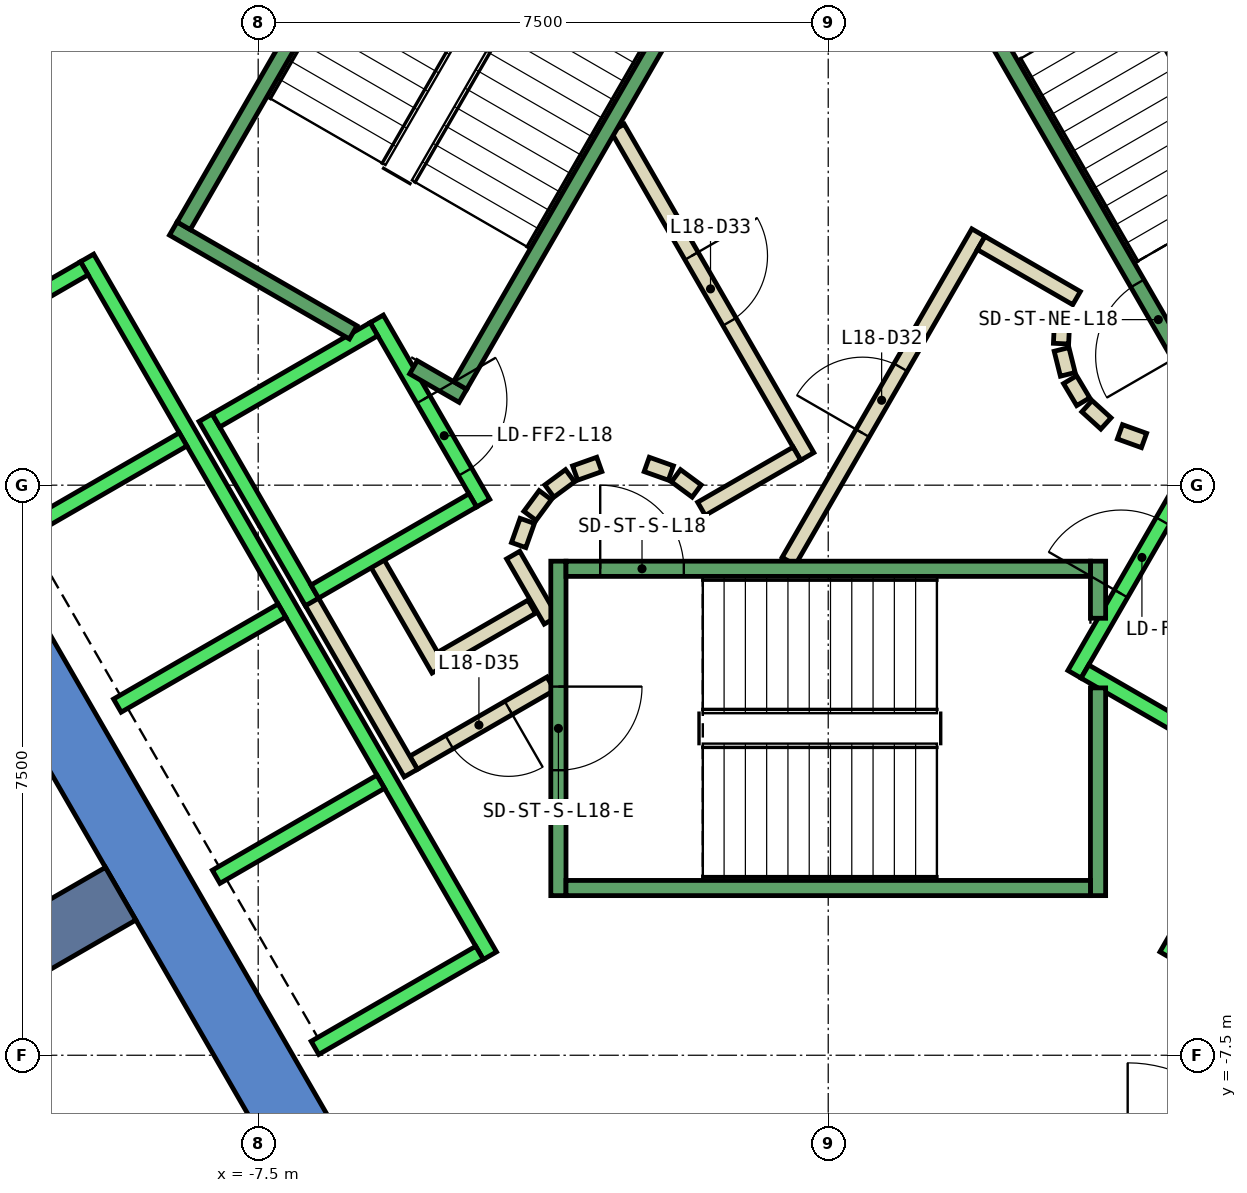
"""IFC4 building model, lengths in metres.
Left out: names, types, materials, properties, quantities, classifications, styles, units other than length and angle.
Written with IfcOpenShell. Run it as: python <this file> out.ifc"""

import sys

from ifc_helpers import new_model, si_unit, direction, frame, frame_2d, origin, place, context, subcontext, project, spatial, polyline, rectangle, outline, extrude, element, fill, save


model = new_model("IFC4")
c1 = context("Model", 3, precision=1e-05, world=origin(), true_north=direction((0.0, 1.0)))
c2 = subcontext(c1, "Body", "Model", "MODEL_VIEW")
j1 = project(units=[si_unit("LENGTHUNIT", "METRE"), si_unit("PLANEANGLEUNIT", "RADIAN")], contexts=[c1])
p1 = place(None, origin())
s1 = spatial("IfcSite", under=j1, at=p1, CompositionType="ELEMENT")
p2 = place(p1, origin())
s2 = spatial("IfcBuilding", under=s1, at=p2, CompositionType="ELEMENT")
p3 = place(p2, frame((0.0, 0.0, 86.6)))
s3 = spatial("IfcBuildingStorey", under=s2, at=p3, CompositionType="ELEMENT", Elevation=86.6)
p4 = place(p3, frame((0.0, 0.0, -0.6)))
e1 = element("IfcWall", 1, at=p4, inside=s3, PredefinedType="SHEAR", context=c2, shape_type="SweptSolid", body=[
    extrude(outline(polyline([(-12.267, 5.252), (-11.488, 4.802), (-6.409, 13.6), (-6.928, 14.5), (-12.267, 5.252)])), origin(), (0.0, 0.0, 1.0), 4.4),
])
p5 = place(p3, frame((0.0, 0.0, -0.6)))
e2 = element("IfcWall", 2, at=p5, inside=s3, PredefinedType="SHEAR", context=c2, shape_type="SweptSolid", body=[
    extrude(outline(polyline([(-13.856, 2.5), (-6.928, -9.5), (-6.409, -8.6), (-12.817, 2.5), (-13.856, 2.5)])), origin(), (0.0, 0.0, 1.0), 4.4),
])
p6 = place(p3, frame((-9.31, -5.375, -0.6), z_axis=(0.0, 0.0, 1.0), x_axis=(-0.866017533419, -0.500013631625, 0.0)))
e3 = element("IfcWall", 3, at=p6, inside=s3, PredefinedType="SHEAR", context=c2, shape_type="SweptSolid", body=[
    extrude(rectangle(XDim=9.0, YDim=0.8, at=frame_2d((4.5, 0.0))), origin(), (0.0, 0.0, 1.0), 4.4),
])
p7 = place(p3, frame((-3.9, -1.599, 0.0), z_axis=(0.0, 0.0, 1.0), x_axis=(-0.865969445389, -0.500096910261, 0.0)))
e4 = element("IfcWall", 4, at=p7, inside=s3, PredefinedType="PARTITIONING", context=c2, shape_type="SweptSolid", body=[
    extrude(rectangle(XDim=1.373, YDim=0.2, at=frame_2d((0.687, 0.0))), origin(), (0.0, 0.0, 1.0), 3.8),
])
p8 = place(p3, frame((-5.126, -2.422, 0.0), z_axis=(0.0, 0.0, 1.0), x_axis=(-0.500062241894, 0.865989465428, 0.0)))
e5 = element("IfcWall", 5, at=p8, inside=s3, PredefinedType="PARTITIONING", context=c2, shape_type="SweptSolid", body=[
    extrude(rectangle(XDim=1.7, YDim=0.2, at=frame_2d((0.85, 0.0))), origin(), (0.0, 0.0, 1.0), 3.8),
])
p9 = place(p3, frame((-3.65, -2.61, 0.0), z_axis=(0.0, 0.0, 1.0), x_axis=(-0.866072462134, -0.499918483688, 0.0)))
e6 = element("IfcWall", 6, at=p9, inside=s3, PredefinedType="PARTITIONING", context=c2, shape_type="SweptSolid", body=[
    extrude(rectangle(XDim=2.084, YDim=0.2, at=frame_2d((1.042, 0.0))), origin(), (0.0, 0.0, 1.0), 3.8),
])
p10 = place(p9, frame((0.642, 0.0, 0.0)))
e7 = element("IfcOpeningElement", 7, at=p10, cuts=e6, PredefinedType="OPENING", context=c2, shape_type="SweptSolid", body=[
    extrude(rectangle(XDim=0.9, YDim=2.1, at=frame_2d((0.45, 1.05))), frame((0.0, 0.11, 0.0), z_axis=(0.0, -1.0, 0.0), x_axis=(1.0, 0.0, 0.0)), (0.0, 0.0, 1.0), 0.22),
])
p11 = place(p3, frame((-5.492, -3.788, 0.0), z_axis=(0.0, 0.0, 1.0), x_axis=(-0.500008949224, 0.866020236886, 0.0)))
e8 = element("IfcWall", 8, at=p11, inside=s3, PredefinedType="PARTITIONING", context=c2, shape_type="SweptSolid", body=[
    extrude(rectangle(XDim=2.68, YDim=0.2, at=frame_2d((1.34, 0.0))), origin(), (0.0, 0.0, 1.0), 3.8),
])
p12 = place(p3, frame((-4.145, -0.92, 0.0), z_axis=(0.0, 0.0, 1.0), x_axis=(0.499743786207, -0.866173278362, 0.0)))
e9 = element("IfcWall", 9, at=p12, inside=s3, PredefinedType="PARTITIONING", context=c2, shape_type="SweptSolid", body=[
    extrude(rectangle(XDim=0.991, YDim=0.2, at=frame_2d((0.495, 0.0))), origin(), (0.0, 0.0, 1.0), 3.8),
])
p13 = place(p3, frame((-0.52, -1.0, 0.0), z_axis=(0.0, 0.0, 1.0), x_axis=(0.50011622646, 0.865958290007, 0.0)))
e10 = element("IfcWall", 10, at=p13, inside=s3, PredefinedType="PARTITIONING", context=c2, shape_type="SweptSolid", body=[
    extrude(rectangle(XDim=4.991, YDim=0.2, at=frame_2d((2.496, 0.0))), origin(), (0.0, 0.0, 1.0), 3.8),
])
p14 = place(p13, frame((1.945, 0.0, 0.0)))
e11 = element("IfcOpeningElement", 11, at=p14, cuts=e10, PredefinedType="OPENING", context=c2, shape_type="SweptSolid", body=[
    extrude(rectangle(XDim=1.0, YDim=2.1, at=frame_2d((0.5, 1.05))), frame((0.0, 0.11, 0.0), z_axis=(0.0, -1.0, 0.0), x_axis=(1.0, 0.0, 0.0)), (0.0, 0.0, 1.0), 0.22),
])
p15 = place(p3, frame((2.012, 3.186, 0.0), z_axis=(0.0, 0.0, 1.0), x_axis=(0.865891012941, -0.500232699559, 0.0)))
e12 = element("IfcWall", 12, at=p15, inside=s3, PredefinedType="PARTITIONING", context=c2, shape_type="SweptSolid", body=[
    extrude(rectangle(XDim=1.449, YDim=0.2, at=frame_2d((0.725, 0.0))), origin(), (0.0, 0.0, 1.0), 3.8),
])
p16 = place(p3, frame((3.079, 2.199, 0.0), z_axis=(0.0, 0.0, 1.0), x_axis=(-0.047771483479, -0.998858290933, 0.0)))
e13 = element("IfcWall", 13, at=p16, inside=s3, PredefinedType="PARTITIONING", context=c2, shape_type="SweptSolid", body=[
    extrude(rectangle(XDim=0.337, YDim=0.2, at=frame_2d((0.169, 0.0))), origin(), (0.0, 0.0, 1.0), 3.8),
])
p17 = place(p3, frame((3.07, 1.786, 0.0), z_axis=(0.0, 0.0, 1.0), x_axis=(0.242705583207, -0.970099994784, 0.0)))
e14 = element("IfcWall", 14, at=p17, inside=s3, PredefinedType="PARTITIONING", context=c2, shape_type="SweptSolid", body=[
    extrude(rectangle(XDim=0.338, YDim=0.2, at=frame_2d((0.169, 0.0))), origin(), (0.0, 0.0, 1.0), 3.8),
])
for number, where, z_axis, x_axis in (
    (15, (3.182, 1.388, 0.0), (0.0, 0.0, 1.0), (0.512, -0.859, 0.0)),
    (16, (3.404, 1.039, 0.0), (0.0, 0.0, 1.0), (0.74, -0.672, 0.0)),
):
    element("IfcWall", number, at=place(p3, frame(where, z_axis=z_axis, x_axis=x_axis)), inside=s3, PredefinedType="PARTITIONING", context=c2, shape_type="SweptSolid", body=[
        extrude(rectangle(XDim=0.338, YDim=0.2, at=frame_2d((0.169, 0.0))), origin(), (0.0, 0.0, 1.0), 3.8),
    ])
p18 = place(p3, frame((3.838, 0.702, 0.0), z_axis=(0.0, 0.0, 1.0), x_axis=(0.941035081519, -0.338308993895, 0.0)))
e17 = element("IfcWall", 17, at=p18, inside=s3, PredefinedType="PARTITIONING", context=c2, shape_type="SweptSolid", body=[
    extrude(rectangle(XDim=0.337, YDim=0.2, at=frame_2d((0.168, 0.0))), origin(), (0.0, 0.0, 1.0), 3.8),
])
p19 = place(p3, frame((-2.771, 4.7, 0.0), z_axis=(0.0, 0.0, 1.0), x_axis=(0.499969479948, -0.866043023828, 0.0)))
e18 = element("IfcWall", 18, at=p19, inside=s3, PredefinedType="PARTITIONING", context=c2, shape_type="SweptSolid", body=[
    extrude(rectangle(XDim=4.99, YDim=0.2, at=frame_2d((2.495, 0.0))), origin(), (0.0, 0.0, 1.0), 3.8),
])
p20 = place(p19, frame((1.945, 0.0, 0.0)))
e19 = element("IfcOpeningElement", 19, at=p20, cuts=e18, PredefinedType="OPENING", context=c2, shape_type="SweptSolid", body=[
    extrude(rectangle(XDim=1.0, YDim=2.1, at=frame_2d((0.5, 1.05))), frame((0.0, 0.11, 0.0), z_axis=(0.0, -1.0, 0.0), x_axis=(1.0, 0.0, 0.0)), (0.0, 0.0, 1.0), 0.22),
])
p21 = place(p3, frame((-0.412, 0.414, 0.0), z_axis=(0.0, 0.0, 1.0), x_axis=(-0.866017369001, -0.500013916395, 0.0)))
e20 = element("IfcWall", 20, at=p21, inside=s3, PredefinedType="PARTITIONING", context=c2, shape_type="SweptSolid", body=[
    extrude(rectangle(XDim=1.45, YDim=0.2, at=frame_2d((0.725, 0.0))), origin(), (0.0, 0.0, 1.0), 3.8),
])
p22 = place(p3, frame((-1.731, -0.077, 0.0), z_axis=(0.0, 0.0, 1.0), x_axis=(-0.804311165252, 0.594208338422, 0.0)))
e21 = element("IfcWall", 21, at=p22, inside=s3, PredefinedType="PARTITIONING", context=c2, shape_type="SweptSolid", body=[
    extrude(rectangle(XDim=0.338, YDim=0.2, at=frame_2d((0.169, 0.0))), origin(), (0.0, 0.0, 1.0), 3.8),
])
p23 = place(p3, frame((-2.07, 0.16, 0.0), z_axis=(0.0, 0.0, 1.0), x_axis=(-0.942199461132, 0.335052496547, 0.0)))
e22 = element("IfcWall", 22, at=p23, inside=s3, PredefinedType="PARTITIONING", context=c2, shape_type="SweptSolid", body=[
    extrude(rectangle(XDim=0.337, YDim=0.2, at=frame_2d((0.169, 0.0))), origin(), (0.0, 0.0, 1.0), 3.8),
])
p24 = place(p3, frame((-3.012, 0.273, 0.0), z_axis=(0.0, 0.0, 1.0), x_axis=(-0.942280615813, -0.334824194261, 0.0)))
e23 = element("IfcWall", 23, at=p24, inside=s3, PredefinedType="PARTITIONING", context=c2, shape_type="SweptSolid", body=[
    extrude(rectangle(XDim=0.338, YDim=0.2, at=frame_2d((0.169, 0.0))), origin(), (0.0, 0.0, 1.0), 3.8),
])
p25 = place(p3, frame((-3.397, 0.124, 0.0), z_axis=(0.0, 0.0, 1.0), x_axis=(-0.804311165252, -0.594208338422, 0.0)))
e24 = element("IfcWall", 24, at=p25, inside=s3, PredefinedType="PARTITIONING", context=c2, shape_type="SweptSolid", body=[
    extrude(rectangle(XDim=0.338, YDim=0.2, at=frame_2d((0.169, 0.0))), origin(), (0.0, 0.0, 1.0), 3.8),
])
p26 = place(p3, frame((-3.723, -0.131, 0.0), z_axis=(0.0, 0.0, 1.0), x_axis=(-0.594675113454, -0.803966112121, 0.0)))
e25 = element("IfcWall", 25, at=p26, inside=s3, PredefinedType="PARTITIONING", context=c2, shape_type="SweptSolid", body=[
    extrude(rectangle(XDim=0.338, YDim=0.2, at=frame_2d((0.169, 0.0))), origin(), (0.0, 0.0, 1.0), 3.8),
])
p27 = place(p3, frame((-3.96, -0.47, 0.0), z_axis=(0.0, 0.0, 1.0), x_axis=(-0.334824194261, -0.942280615813, 0.0)))
e26 = element("IfcWall", 26, at=p27, inside=s3, PredefinedType="PARTITIONING", context=c2, shape_type="SweptSolid", body=[
    extrude(rectangle(XDim=0.338, YDim=0.2, at=frame_2d((0.169, 0.0))), origin(), (0.0, 0.0, 1.0), 3.8),
])
p28 = place(p3, frame((-5.94, 2.188, 0.0), z_axis=(0.0, 0.0, 1.0), x_axis=(0.49994636267, -0.866056369097, 0.0)))
e27 = element("IfcWall", 27, at=p28, inside=s3, PredefinedType="STANDARD", context=c2, shape_type="SweptSolid", body=[
    extrude(rectangle(XDim=2.8, YDim=0.2, at=frame_2d((1.4, 0.0))), origin(), (0.0, 0.0, 1.0), 3.8),
])
p29 = place(p28, frame((1.225, 0.0, 0.0)))
e28 = element("IfcOpeningElement", 28, at=p29, cuts=e27, PredefinedType="OPENING", context=c2, shape_type="SweptSolid", body=[
    extrude(rectangle(XDim=1.1, YDim=2.1, at=frame_2d((0.55, 1.05))), frame((0.0, 0.11, 0.0), z_axis=(0.0, -1.0, 0.0), x_axis=(1.0, 0.0, 0.0)), (0.0, 0.0, 1.0), 0.22),
])
p30 = place(p3, frame((-8.192, 0.888, 0.0), z_axis=(0.0, 0.0, 1.0), x_axis=(0.49994636267, -0.866056369097, 0.0)))
e29 = element("IfcWall", 29, at=p30, inside=s3, PredefinedType="STANDARD", context=c2, shape_type="SweptSolid", body=[
    extrude(rectangle(XDim=2.8, YDim=0.2, at=frame_2d((1.4, 0.0))), origin(), (0.0, 0.0, 1.0), 3.8),
])
for number, where, z_axis, x_axis in (
    (30, (-5.977, 2.052, 0.0), (0.0, 0.0, 1.0), (-0.866, -0.5, 0.0)),
    (31, (-4.677, -0.2, 0.0), (0.0, 0.0, 1.0), (-0.866, -0.5, 0.0)),
):
    element("IfcWall", number, at=place(p3, frame(where, z_axis=z_axis, x_axis=x_axis)), inside=s3, PredefinedType="STANDARD", context=c2, shape_type="SweptSolid", body=[
        extrude(rectangle(XDim=2.399, YDim=0.2, at=frame_2d((1.2, 0.0))), origin(), (0.0, 0.0, 1.0), 3.8),
    ])
p31 = place(p3, frame((-9.751, 2.99, 0.0), z_axis=(0.0, 0.0, 1.0), x_axis=(0.50000090737, -0.866024879913, 0.0)))
e32 = element("IfcWall", 32, at=p31, inside=s3, PredefinedType="STANDARD", context=c2, shape_type="SweptSolid", body=[
    extrude(rectangle(XDim=10.6, YDim=0.2, at=frame_2d((5.3, 0.0))), origin(), (0.0, 0.0, 1.0), 3.8),
])
p32 = place(p3, frame((-9.788, 2.853, 0.0), z_axis=(0.0, 0.0, 1.0), x_axis=(-0.865998541277, -0.500046524342, 0.0)))
e33 = element("IfcWall", 33, at=p32, inside=s3, PredefinedType="STANDARD", context=c2, shape_type="SweptSolid", body=[
    extrude(rectangle(XDim=2.5, YDim=0.2, at=frame_2d((1.25, 0.0))), origin(), (0.0, 0.0, 1.0), 3.8),
])
for number, where, z_axis, x_axis in (
    (34, (-8.488, 0.602, 0.0), (0.0, 0.0, 1.0), (-0.866, -0.5, 0.0)),
    (35, (-7.188, -1.65, 0.0), (0.0, 0.0, 1.0), (-0.866, -0.5, 0.0)),
    (36, (-5.888, -3.902, 0.0), (0.0, 0.0, 1.0), (-0.866, -0.5, 0.0)),
    (37, (-4.588, -6.153, 0.0), (0.0, 0.0, 1.0), (-0.866, -0.5, 0.0)),
):
    element("IfcWall", number, at=place(p3, frame(where, z_axis=z_axis, x_axis=x_axis)), inside=s3, PredefinedType="STANDARD", context=c2, shape_type="SweptSolid", body=[
        extrude(rectangle(XDim=2.5, YDim=0.2, at=frame_2d((1.25, 0.0))), origin(), (0.0, 0.0, 1.0), 3.8),
    ])
p33 = place(p3, frame((3.24, -2.488, 0.0), z_axis=(0.0, 0.0, 1.0), x_axis=(0.49994636267, 0.866056369097, 0.0)))
e38 = element("IfcWall", 38, at=p33, inside=s3, PredefinedType="STANDARD", context=c2, shape_type="SweptSolid", body=[
    extrude(rectangle(XDim=2.8, YDim=0.2, at=frame_2d((1.4, 0.0))), origin(), (0.0, 0.0, 1.0), 3.8),
])
p34 = place(p33, frame((1.225, 0.0, 0.0)))
e39 = element("IfcOpeningElement", 39, at=p34, cuts=e38, PredefinedType="OPENING", context=c2, shape_type="SweptSolid", body=[
    extrude(rectangle(XDim=1.1, YDim=2.1, at=frame_2d((0.55, 1.05))), frame((0.0, 0.11, 0.0), z_axis=(0.0, -1.0, 0.0), x_axis=(1.0, 0.0, 0.0)), (0.0, 0.0, 1.0), 0.22),
])
p35 = place(p3, frame((3.377, -2.452, 0.0), z_axis=(0.0, 0.0, 1.0), x_axis=(0.865955154139, -0.50012165622, 0.0)))
e40 = element("IfcWall", 40, at=p35, inside=s3, PredefinedType="STANDARD", context=c2, shape_type="SweptSolid", body=[
    extrude(rectangle(XDim=2.4, YDim=0.2, at=frame_2d((1.2, 0.0))), origin(), (0.0, 0.0, 1.0), 3.8),
])
p36 = place(p3, frame((4.451, -6.19, 0.0), z_axis=(0.0, 0.0, 1.0), x_axis=(0.50000090737, 0.866024879913, 0.0)))
e41 = element("IfcWall", 41, at=p36, inside=s3, PredefinedType="STANDARD", context=c2, shape_type="SweptSolid", body=[
    extrude(rectangle(XDim=10.6, YDim=0.2, at=frame_2d((5.3, 0.0))), origin(), (0.0, 0.0, 1.0), 3.8),
])
p37 = place(p3, frame((-3.55, -1.0, 0.0), z_axis=(0.0, 0.0, 1.0), x_axis=(0.0, -1.0, 0.0)))
e42 = element("IfcWall", 42, at=p37, inside=s3, PredefinedType="STANDARD", context=c2, shape_type="SweptSolid", body=[
    extrude(rectangle(XDim=4.4, YDim=0.2, at=frame_2d((2.2, 0.0))), origin(), (0.0, 0.0, 1.0), 3.8),
])
p38 = place(p37, frame((1.65, 0.0, 0.0)))
e43 = element("IfcOpeningElement", 43, at=p38, cuts=e42, PredefinedType="OPENING", context=c2, shape_type="SweptSolid", body=[
    extrude(rectangle(XDim=1.1, YDim=2.2, at=frame_2d((0.55, 1.1))), frame((0.0, 0.11, 0.0), z_axis=(0.0, -1.0, 0.0), x_axis=(1.0, 0.0, 0.0)), (0.0, 0.0, 1.0), 0.22),
])
p39 = place(p3, frame((3.55, -2.667, 0.0), z_axis=(0.0, 0.0, 1.0), x_axis=(0.0, -1.0, 0.0)))
e44 = element("IfcWall", 44, at=p39, inside=s3, PredefinedType="STANDARD", context=c2, shape_type="SweptSolid", body=[
    extrude(rectangle(XDim=2.733, YDim=0.2, at=frame_2d((1.366, 0.0))), origin(), (0.0, 0.0, 1.0), 3.8),
])
p40 = place(p3, frame((3.55, -1.0, 0.0), z_axis=(0.0, 0.0, 1.0), x_axis=(0.0, -1.0, 0.0)))
e45 = element("IfcWall", 45, at=p40, inside=s3, PredefinedType="STANDARD", context=c2, shape_type="SweptSolid", body=[
    extrude(rectangle(XDim=0.751, YDim=0.2, at=frame_2d((0.375, 0.0))), origin(), (0.0, 0.0, 1.0), 3.8),
])
p41 = place(p3, frame((-3.45, -1.1, 0.0), z_axis=(0.0, 0.0, 1.0), x_axis=(1.0, 0.0, 0.0)))
e46 = element("IfcWall", 46, at=p41, inside=s3, PredefinedType="STANDARD", context=c2, shape_type="SweptSolid", body=[
    extrude(rectangle(XDim=6.9, YDim=0.2, at=frame_2d((3.45, 0.0))), origin(), (0.0, 0.0, 1.0), 3.8),
])
p42 = place(p41, frame((0.45, 0.0, 0.0)))
e47 = element("IfcOpeningElement", 47, at=p42, cuts=e46, PredefinedType="OPENING", context=c2, shape_type="SweptSolid", body=[
    extrude(rectangle(XDim=1.1, YDim=2.2, at=frame_2d((0.55, 1.1))), frame((0.0, 0.11, 0.0), z_axis=(0.0, -1.0, 0.0), x_axis=(1.0, 0.0, 0.0)), (0.0, 0.0, 1.0), 0.22),
])
p43 = place(p3, frame((-3.45, -5.3, 0.0), z_axis=(0.0, 0.0, 1.0), x_axis=(1.0, 0.0, 0.0)))
e48 = element("IfcWall", 48, at=p43, inside=s3, PredefinedType="STANDARD", context=c2, shape_type="SweptSolid", body=[
    extrude(rectangle(XDim=6.9, YDim=0.2, at=frame_2d((3.45, 0.0))), origin(), (0.0, 0.0, 1.0), 3.8),
])
p44 = place(p3, frame((4.843, 1.312, 0.0), z_axis=(0.0, 0.0, 1.0), x_axis=(-0.499963383562, 0.866046543262, 0.0)))
e49 = element("IfcWall", 49, at=p44, inside=s3, PredefinedType="STANDARD", context=c2, shape_type="SweptSolid", body=[
    extrude(rectangle(XDim=6.9, YDim=0.2, at=frame_2d((3.45, 0.0))), origin(), (0.0, 0.0, 1.0), 3.8),
])
p45 = place(p44, frame((0.45, 0.0, 0.0)))
e50 = element("IfcOpeningElement", 50, at=p45, cuts=e49, PredefinedType="OPENING", context=c2, shape_type="SweptSolid", body=[
    extrude(rectangle(XDim=1.1, YDim=2.2, at=frame_2d((0.55, 1.1))), frame((0.0, 0.11, 0.0), z_axis=(0.0, -1.0, 0.0), x_axis=(1.0, 0.0, 0.0)), (0.0, 0.0, 1.0), 0.22),
])
p46 = place(p3, frame((-6.25, 2.01, 0.0), z_axis=(0.0, 0.0, 1.0), x_axis=(-0.86611865017, 0.499838457731, 0.0)))
e51 = element("IfcWall", 51, at=p46, inside=s3, PredefinedType="STANDARD", context=c2, shape_type="SweptSolid", body=[
    extrude(rectangle(XDim=2.733, YDim=0.2, at=frame_2d((1.366, 0.0))), origin(), (0.0, 0.0, 1.0), 3.8),
])
p47 = place(p3, frame((-4.806, 1.176, 0.0), z_axis=(0.0, 0.0, 1.0), x_axis=(-0.866558586415, 0.499075361355, 0.0)))
e52 = element("IfcWall", 52, at=p47, inside=s3, PredefinedType="STANDARD", context=c2, shape_type="SweptSolid", body=[
    extrude(rectangle(XDim=0.751, YDim=0.2, at=frame_2d((0.376, 0.0))), origin(), (0.0, 0.0, 1.0), 3.8),
])
p48 = place(p3, frame((-1.393, 7.288, 0.0), z_axis=(0.0, 0.0, 1.0), x_axis=(-0.499963383562, -0.866046543262, 0.0)))
e53 = element("IfcWall", 53, at=p48, inside=s3, PredefinedType="STANDARD", context=c2, shape_type="SweptSolid", body=[
    extrude(rectangle(XDim=6.9, YDim=0.2, at=frame_2d((3.45, 0.0))), origin(), (0.0, 0.0, 1.0), 3.8),
])
p49 = place(p48, frame((0.45, 0.0, 0.0)))
e54 = element("IfcOpeningElement", 54, at=p49, cuts=e53, PredefinedType="OPENING", context=c2, shape_type="SweptSolid", body=[
    extrude(rectangle(XDim=1.1, YDim=2.2, at=frame_2d((0.55, 1.1))), frame((0.0, 0.11, 0.0), z_axis=(0.0, -1.0, 0.0), x_axis=(1.0, 0.0, 0.0)), (0.0, 0.0, 1.0), 0.22),
])
p50 = place(p3, frame((-5.03, 9.388, 0.0), z_axis=(0.0, 0.0, 1.0), x_axis=(-0.499978703459, -0.866037698999, 0.0)))
e55 = element("IfcWall", 55, at=p50, inside=s3, PredefinedType="STANDARD", context=c2, shape_type="SweptSolid", body=[
    extrude(rectangle(XDim=6.9, YDim=0.2, at=frame_2d((3.45, 0.0))), origin(), (0.0, 0.0, 1.0), 3.8),
])
p51 = place(p14, origin())
e56 = element("IfcDoor", 56, at=p51, inside=s3, OperationType="SINGLE_SWING_LEFT", PredefinedType="DOOR", context=c2, shape_type="SweptSolid", body=[
    extrude(rectangle(XDim=1.0, YDim=2.1, at=frame_2d((0.5, 1.05))), frame((0.0, 0.025, 0.0), z_axis=(0.0, -1.0, 0.0), x_axis=(1.0, 0.0, 0.0)), (0.0, 0.0, 1.0), 0.05),
])
fill(e11, e56)
p52 = place(p20, origin())
e57 = element("IfcDoor", 57, at=p52, inside=s3, OperationType="SINGLE_SWING_RIGHT", PredefinedType="DOOR", context=c2, shape_type="SweptSolid", body=[
    extrude(rectangle(XDim=1.0, YDim=2.1, at=frame_2d((0.5, 1.05))), frame((0.0, 0.025, 0.0), z_axis=(0.0, -1.0, 0.0), x_axis=(1.0, 0.0, 0.0)), (0.0, 0.0, 1.0), 0.05),
])
fill(e19, e57)
p53 = place(p10, origin())
e58 = element("IfcDoor", 58, at=p53, inside=s3, OperationType="SINGLE_SWING_LEFT", PredefinedType="DOOR", context=c2, shape_type="SweptSolid", body=[
    extrude(rectangle(XDim=0.9, YDim=2.1, at=frame_2d((0.45, 1.05))), frame((0.0, 0.025, 0.0), z_axis=(0.0, -1.0, 0.0), x_axis=(1.0, 0.0, 0.0)), (0.0, 0.0, 1.0), 0.05),
])
fill(e7, e58)
p54 = place(p34, origin())
e59 = element("IfcDoor", 59, at=p54, inside=s3, OperationType="SLIDING_TO_LEFT", PredefinedType="DOOR", context=c2, shape_type="SweptSolid", body=[
    extrude(rectangle(XDim=1.1, YDim=2.1, at=frame_2d((0.55, 1.05))), frame((0.0, 0.025, 0.0), z_axis=(0.0, -1.0, 0.0), x_axis=(1.0, 0.0, 0.0)), (0.0, 0.0, 1.0), 0.05),
])
fill(e39, e59)
p55 = place(p29, origin())
e60 = element("IfcDoor", 60, at=p55, inside=s3, OperationType="SLIDING_TO_LEFT", PredefinedType="DOOR", context=c2, shape_type="SweptSolid", body=[
    extrude(rectangle(XDim=1.1, YDim=2.1, at=frame_2d((0.55, 1.05))), frame((0.0, 0.025, 0.0), z_axis=(0.0, -1.0, 0.0), x_axis=(1.0, 0.0, 0.0)), (0.0, 0.0, 1.0), 0.05),
])
fill(e28, e60)
p56 = place(p42, origin())
e61 = element("IfcDoor", 61, at=p56, inside=s3, OperationType="SINGLE_SWING_LEFT", PredefinedType="DOOR", context=c2, shape_type="SweptSolid", body=[
    extrude(rectangle(XDim=1.1, YDim=2.2, at=frame_2d((0.55, 1.1))), frame((0.0, 0.025, 0.0), z_axis=(0.0, -1.0, 0.0), x_axis=(1.0, 0.0, 0.0)), (0.0, 0.0, 1.0), 0.05),
])
fill(e47, e61)
p57 = place(p38, origin())
e62 = element("IfcDoor", 62, at=p57, inside=s3, OperationType="SINGLE_SWING_LEFT", PredefinedType="DOOR", context=c2, shape_type="SweptSolid", body=[
    extrude(rectangle(XDim=1.1, YDim=2.2, at=frame_2d((0.55, 1.1))), frame((0.0, 0.025, 0.0), z_axis=(0.0, -1.0, 0.0), x_axis=(1.0, 0.0, 0.0)), (0.0, 0.0, 1.0), 0.05),
])
fill(e43, e62)
p58 = place(p45, origin())
e63 = element("IfcDoor", 63, at=p58, inside=s3, OperationType="SINGLE_SWING_LEFT", PredefinedType="DOOR", context=c2, shape_type="SweptSolid", body=[
    extrude(rectangle(XDim=1.1, YDim=2.2, at=frame_2d((0.55, 1.1))), frame((0.0, 0.025, 0.0), z_axis=(0.0, -1.0, 0.0), x_axis=(1.0, 0.0, 0.0)), (0.0, 0.0, 1.0), 0.05),
])
fill(e50, e63)
save(model, sys.argv[1])
